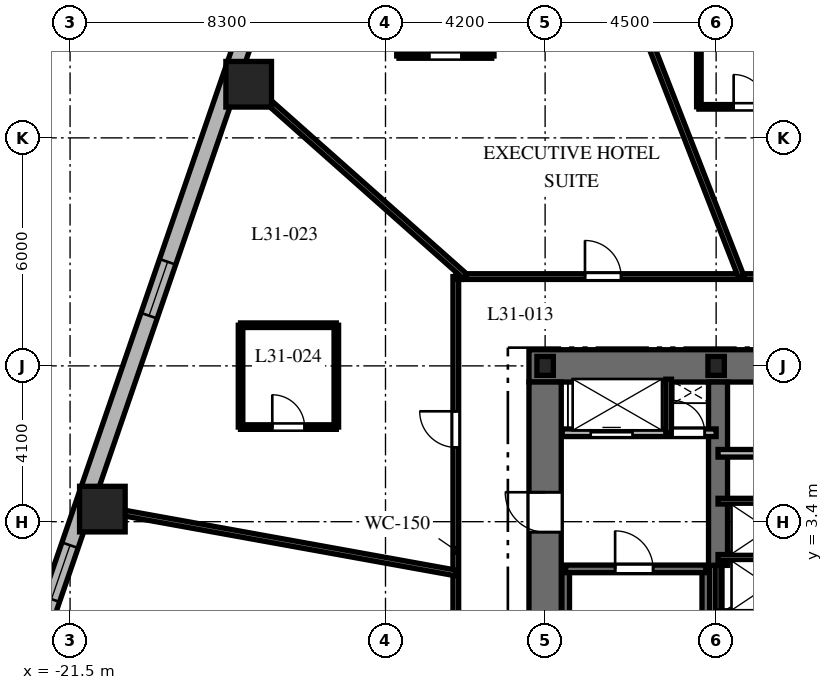
"""IFC4 building model, lengths in metres.
Left out: names, types, materials, properties, quantities, classifications, styles, units other than length and angle.
Written with IfcOpenShell. Run it as: python <this file> out.ifc"""

import sys

from ifc_helpers import new_model, si_unit, direction, frame, frame_2d, origin, origin_2d, place, context, subcontext, project, spatial, rectangle, i_section, extrude, element, fill, save


model = new_model("IFC4")
c1 = context("Model", 3, precision=1e-05, world=origin(), true_north=direction((0.0, 1.0)))
c2 = subcontext(c1, "Body", "Model", "MODEL_VIEW")
j1 = project(units=[si_unit("LENGTHUNIT", "METRE"), si_unit("PLANEANGLEUNIT", "RADIAN")], contexts=[c1])
p1 = place(None, origin())
s1 = spatial("IfcSite", under=j1, at=p1, CompositionType="ELEMENT")
p2 = place(p1, origin())
s2 = spatial("IfcBuilding", under=s1, at=p2, CompositionType="ELEMENT")
p3 = place(p2, frame((0.0, 0.0, 128.4)))
s3 = spatial("IfcBuildingStorey", under=s2, at=p3, CompositionType="ELEMENT", Elevation=128.4)
p4 = place(p3, frame((-9.425, 7.5, 0.0), z_axis=(0.0, 0.0, 1.0), x_axis=(1.0, 0.0, 0.0)))
e1 = element("IfcWall", 1, at=p4, inside=s3, PredefinedType="SHEAR", context=c2, shape_type="SweptSolid", body=[
    extrude(rectangle(XDim=9.475, YDim=0.85, at=frame_2d((4.738, 0.0))), origin(), (0.0, 0.0, 1.0), 3.7),
])
p5 = place(p3, frame((-9.0, -7.075, 0.0), z_axis=(0.0, 0.0, 1.0), x_axis=(0.0, 1.0, 0.0)))
e2 = element("IfcWall", 2, at=p5, inside=s3, PredefinedType="SHEAR", context=c2, shape_type="SweptSolid", body=[
    extrude(rectangle(XDim=14.15, YDim=0.85, at=frame_2d((7.075, 0.0))), origin(), (0.0, 0.0, 1.0), 3.7),
])
p6 = place(p5, frame((10.2, 0.0, 0.0)))
e3 = element("IfcOpeningElement", 3, at=p6, cuts=e2, PredefinedType="OPENING", context=c2, shape_type="SweptSolid", body=[
    extrude(rectangle(XDim=1.05, YDim=2.15, at=frame_2d((0.525, 1.075))), frame((0.0, 0.435, 0.0), z_axis=(0.0, -1.0, 0.0), x_axis=(1.0, 0.0, 0.0)), (0.0, 0.0, 1.0), 0.87),
])
p7 = place(p3, frame((-4.45, 2.25, 0.0), z_axis=(0.0, 0.0, 1.0), x_axis=(0.0, 1.0, 0.0)))
e4 = element("IfcWall", 4, at=p7, inside=s3, PredefinedType="SHEAR", context=c2, shape_type="SweptSolid", body=[
    extrude(rectangle(XDim=4.825, YDim=0.5, at=frame_2d((2.413, 0.0))), origin(), (0.0, 0.0, 1.0), 3.7),
])
for number, where, z_axis, x_axis in (
    (5, (-8.458, -6.985, 0.0), (0.0, 0.0, 1.0), (0.0, 1.0, 0.0)),
    (6, (-4.772, -6.985, 0.0), (0.0, 0.0, 1.0), (0.0, 1.0, 0.0)),
):
    element("IfcWall", number, at=place(p3, frame(where, z_axis=z_axis, x_axis=x_axis)), inside=s3, PredefinedType="SHEAR", context=c2, shape_type="SweptSolid", body=[
        extrude(rectangle(XDim=9.143, YDim=0.2, at=frame_2d((4.572, 0.0))), origin(), (0.0, 0.0, 1.0), 3.7),
    ])
p8 = place(p3, frame((-8.458, 2.158, 0.0), z_axis=(0.0, 0.0, 1.0), x_axis=(1.0, 0.0, 0.0)))
e7 = element("IfcWall", 7, at=p8, inside=s3, PredefinedType="SHEAR", context=c2, shape_type="SweptSolid", body=[
    extrude(rectangle(XDim=3.686, YDim=0.2, at=frame_2d((1.843, 0.0))), origin(), (0.0, 0.0, 1.0), 3.7),
])
p9 = place(p8, frame((1.3, 0.0, 0.0)))
e8 = element("IfcOpeningElement", 8, at=p9, cuts=e7, PredefinedType="OPENING", context=c2, shape_type="SweptSolid", body=[
    extrude(rectangle(XDim=1.0, YDim=2.15, at=frame_2d((0.5, 1.075))), frame((0.0, 0.11, 0.0), z_axis=(0.0, -1.0, 0.0), x_axis=(1.0, 0.0, 0.0)), (0.0, 0.0, 1.0), 0.22),
])
for number, where, z_axis, x_axis in (
    (9, (-4.5, 7.5, 0.0), (0.0, 0.0, 1.0), (1.0, 0.0, 0.0)),
    (10, (-9.0, 7.5, 0.0), (0.0, 0.0, 1.0), (1.0, 0.0, 0.0)),
):
    element("IfcColumn", number, at=place(p3, frame(where, z_axis=z_axis, x_axis=x_axis)), inside=s3, PredefinedType="COLUMN", context=c2, shape_type="SweptSolid", body=[
        extrude(i_section(OverallWidth=0.432, OverallDepth=0.498, WebThickness=0.056, FlangeThickness=0.089, at=origin_2d()), origin(), (0.0, 0.0, 1.0), 3.7),
    ])
for number, where, z_axis, x_axis in (
    (11, (-16.8, 14.911, 0.0), (0.0, 0.0, 1.0), (1.0, 0.0, 0.0)),
    (12, (-20.65, 3.731, 0.0), (0.0, 0.0, 1.0), (1.0, 0.0, 0.0)),
):
    element("IfcColumn", number, at=place(p3, frame(where, z_axis=z_axis, x_axis=x_axis)), inside=s3, PredefinedType="COLUMN", context=c2, shape_type="SweptSolid", body=[
        extrude(rectangle(XDim=1.2, YDim=1.2, at=origin_2d()), origin(), (0.0, 0.0, 1.0), 3.7),
    ])
p10 = place(p3, frame((-15.992, 18.777, 0.0), z_axis=(0.0, 0.0, 1.0), x_axis=(-0.325606988926, -0.945505202927, 0.0)))
e13 = element("IfcWall", 13, at=p10, inside=s3, PredefinedType="SOLIDWALL", context=c2, shape_type="SweptSolid", body=[
    extrude(rectangle(XDim=19.669, YDim=0.45, at=frame_2d((9.835, 0.0))), origin(), (0.0, 0.0, 1.0), 3.4),
])
p11 = place(p10, frame((1.197, 0.0, 0.8)))
e14 = element("IfcOpeningElement", 14, at=p11, cuts=e13, PredefinedType="OPENING", context=c2, shape_type="SweptSolid", body=[
    extrude(rectangle(XDim=1.5, YDim=1.8, at=frame_2d((0.75, 0.9))), frame((0.0, 0.235, 0.0), z_axis=(0.0, -1.0, 0.0), x_axis=(1.0, 0.0, 0.0)), (0.0, 0.0, 1.0), 0.47),
])
p12 = place(p10, frame((9.03, 0.0, 0.8)))
e15 = element("IfcOpeningElement", 15, at=p12, cuts=e13, PredefinedType="OPENING", context=c2, shape_type="SweptSolid", body=[
    extrude(rectangle(XDim=1.5, YDim=1.8, at=frame_2d((0.75, 0.9))), frame((0.0, 0.235, 0.0), z_axis=(0.0, -1.0, 0.0), x_axis=(1.0, 0.0, 0.0)), (0.0, 0.0, 1.0), 0.47),
])
p13 = place(p10, frame((16.918, 0.0, 0.8)))
e16 = element("IfcOpeningElement", 16, at=p13, cuts=e13, PredefinedType="OPENING", context=c2, shape_type="SweptSolid", body=[
    extrude(rectangle(XDim=1.5, YDim=1.8, at=frame_2d((0.75, 0.9))), frame((0.0, 0.235, 0.0), z_axis=(0.0, -1.0, 0.0), x_axis=(1.0, 0.0, 0.0)), (0.0, 0.0, 1.0), 0.47),
])
p14 = place(p3, frame((-8.55, 5.74, 0.0), z_axis=(0.0, 0.0, 1.0), x_axis=(1.0, 0.0, 0.0)))
e17 = element("IfcWall", 17, at=p14, inside=s3, PredefinedType="PARTITIONING", context=c2, shape_type="SweptSolid", body=[
    extrude(rectangle(XDim=4.05, YDim=0.2, at=frame_2d((2.025, 0.0))), origin(), (0.0, 0.0, 1.0), 3.4),
])
p15 = place(p14, frame((0.75, 0.0, 0.0)))
e18 = element("IfcOpeningElement", 18, at=p15, cuts=e17, PredefinedType="OPENING", context=c2, shape_type="SweptSolid", body=[
    extrude(rectangle(XDim=1.1, YDim=2.2, at=frame_2d((0.55, 1.1))), frame((0.0, 0.11, 0.0), z_axis=(0.0, -1.0, 0.0), x_axis=(1.0, 0.0, 0.0)), (0.0, 0.0, 1.0), 0.22),
])
p16 = place(p14, frame((2.9, 0.0, 0.0)))
e19 = element("IfcOpeningElement", 19, at=p16, cuts=e17, PredefinedType="OPENING", context=c2, shape_type="SweptSolid", body=[
    extrude(rectangle(XDim=0.85, YDim=2.03, at=frame_2d((0.425, 1.015))), frame((0.0, 0.11, 0.0), z_axis=(0.0, -1.0, 0.0), x_axis=(1.0, 0.0, 0.0)), (0.0, 0.0, 1.0), 0.22),
])
p17 = place(p3, frame((-5.75, 5.74, 0.0), z_axis=(0.0, 0.0, 1.0), x_axis=(0.0, 1.0, 0.0)))
e20 = element("IfcWall", 20, at=p17, inside=s3, PredefinedType="PARTITIONING", context=c2, shape_type="SweptSolid", body=[
    extrude(rectangle(XDim=1.41, YDim=0.15, at=frame_2d((0.705, 0.0))), origin(), (0.0, 0.0, 1.0), 3.4),
])
p18 = place(p3, frame((-4.45, 5.2, 0.0), z_axis=(0.0, 0.0, 1.0), x_axis=(1.0, 0.0, 0.0)))
e21 = element("IfcWall", 21, at=p18, inside=s3, PredefinedType="PARTITIONING", context=c2, shape_type="SweptSolid", body=[
    extrude(rectangle(XDim=4.5, YDim=0.2, at=frame_2d((2.25, 0.0))), origin(), (0.0, 0.0, 1.0), 3.4),
])
p19 = place(p3, frame((-4.45, -0.5, 0.0), z_axis=(0.0, 0.0, 1.0), x_axis=(0.0, 1.0, 0.0)))
e22 = element("IfcWall", 22, at=p19, inside=s3, PredefinedType="PARTITIONING", context=c2, shape_type="SweptSolid", body=[
    extrude(rectangle(XDim=2.75, YDim=0.15, at=frame_2d((1.375, 0.0))), origin(), (0.0, 0.0, 1.0), 3.4),
])
for number, where, z_axis, x_axis in (
    (23, (-4.45, 3.94, 0.0), (0.0, 0.0, 1.0), (1.0, 0.0, 0.0)),
    (24, (-4.45, 0.98, 0.0), (0.0, 0.0, 1.0), (1.0, 0.0, 0.0)),
    (25, (-4.45, 2.46, 0.0), (0.0, 0.0, 1.0), (1.0, 0.0, 0.0)),
):
    element("IfcWall", number, at=place(p3, frame(where, z_axis=z_axis, x_axis=x_axis)), inside=s3, PredefinedType="PARTITIONING", context=c2, shape_type="SweptSolid", body=[
        extrude(rectangle(XDim=2.55, YDim=0.15, at=frame_2d((1.275, 0.0))), origin(), (0.0, 0.0, 1.0), 3.4),
    ])
p20 = place(p3, frame((-11.35, -9.85, 0.0), z_axis=(0.0, 0.0, 1.0), x_axis=(0.0, 1.0, 0.0)))
e26 = element("IfcWall", 26, at=p20, inside=s3, PredefinedType="PARTITIONING", context=c2, shape_type="SweptSolid", body=[
    extrude(rectangle(XDim=19.7, YDim=0.15, at=frame_2d((9.85, 0.0))), origin(), (0.0, 0.0, 1.0), 2.84),
])
p21 = place(p20, frame((15.205, 0.0, 0.0)))
e27 = element("IfcOpeningElement", 27, at=p21, cuts=e26, PredefinedType="OPENING", context=c2, shape_type="SweptSolid", body=[
    extrude(rectangle(XDim=0.95, YDim=2.03, at=frame_2d((0.475, 1.015))), frame((0.0, 0.085, 0.0), z_axis=(0.0, -1.0, 0.0), x_axis=(1.0, 0.0, 0.0)), (0.0, 0.0, 1.0), 0.17),
])
p22 = place(p20, frame((8.836, 0.0, 0.0)))
e28 = element("IfcOpeningElement", 28, at=p22, cuts=e26, PredefinedType="OPENING", context=c2, shape_type="SweptSolid", body=[
    extrude(rectangle(XDim=0.95, YDim=2.03, at=frame_2d((0.475, 1.015))), frame((0.0, 0.085, 0.0), z_axis=(0.0, -1.0, 0.0), x_axis=(1.0, 0.0, 0.0)), (0.0, 0.0, 1.0), 0.17),
])
p23 = place(p20, frame((3.008, 0.0, 0.0)))
e29 = element("IfcOpeningElement", 29, at=p23, cuts=e26, PredefinedType="OPENING", context=c2, shape_type="SweptSolid", body=[
    extrude(rectangle(XDim=0.95, YDim=2.03, at=frame_2d((0.475, 1.015))), frame((0.0, 0.085, 0.0), z_axis=(0.0, -1.0, 0.0), x_axis=(1.0, 0.0, 0.0)), (0.0, 0.0, 1.0), 0.17),
])
p24 = place(p3, frame((-11.35, 9.85, 0.0), z_axis=(0.0, 0.0, 1.0), x_axis=(1.0, 0.0, 0.0)))
e30 = element("IfcWall", 30, at=p24, inside=s3, PredefinedType="PARTITIONING", context=c2, shape_type="SweptSolid", body=[
    extrude(rectangle(XDim=22.7, YDim=0.15, at=frame_2d((11.35, 0.0))), origin(), (0.0, 0.0, 1.0), 2.84),
])
p25 = place(p24, frame((17.237, 0.0, 0.0)))
e31 = element("IfcOpeningElement", 31, at=p25, cuts=e30, PredefinedType="OPENING", context=c2, shape_type="SweptSolid", body=[
    extrude(rectangle(XDim=0.95, YDim=2.03, at=frame_2d((0.475, 1.015))), frame((0.0, 0.085, 0.0), z_axis=(0.0, -1.0, 0.0), x_axis=(1.0, 0.0, 0.0)), (0.0, 0.0, 1.0), 0.17),
])
p26 = place(p24, frame((11.994, 0.0, 0.0)))
e32 = element("IfcOpeningElement", 32, at=p26, cuts=e30, PredefinedType="OPENING", context=c2, shape_type="SweptSolid", body=[
    extrude(rectangle(XDim=0.95, YDim=2.03, at=frame_2d((0.475, 1.015))), frame((0.0, 0.085, 0.0), z_axis=(0.0, -1.0, 0.0), x_axis=(1.0, 0.0, 0.0)), (0.0, 0.0, 1.0), 0.17),
])
p27 = place(p24, frame((8.559, 0.0, 0.0)))
e33 = element("IfcOpeningElement", 33, at=p27, cuts=e30, PredefinedType="OPENING", context=c2, shape_type="SweptSolid", body=[
    extrude(rectangle(XDim=0.95, YDim=2.03, at=frame_2d((0.475, 1.015))), frame((0.0, 0.085, 0.0), z_axis=(0.0, -1.0, 0.0), x_axis=(1.0, 0.0, 0.0)), (0.0, 0.0, 1.0), 0.17),
])
p28 = place(p24, frame((3.399, 0.0, 0.0)))
e34 = element("IfcOpeningElement", 34, at=p28, cuts=e30, PredefinedType="OPENING", context=c2, shape_type="SweptSolid", body=[
    extrude(rectangle(XDim=0.95, YDim=2.03, at=frame_2d((0.475, 1.015))), frame((0.0, 0.085, 0.0), z_axis=(0.0, -1.0, 0.0), x_axis=(1.0, 0.0, 0.0)), (0.0, 0.0, 1.0), 0.17),
])
p29 = place(p3, frame((-3.842, 9.85, 0.0), z_axis=(0.0, 0.0, 1.0), x_axis=(-0.363432685593, 0.931620460833, 0.0)))
e35 = element("IfcWall", 35, at=p29, inside=s3, PredefinedType="PARTITIONING", context=c2, shape_type="SweptSolid", body=[
    extrude(rectangle(XDim=12.049, YDim=0.15, at=frame_2d((6.024, 0.0))), origin(), (0.0, 0.0, 1.0), 2.54),
])
p30 = place(p3, frame((-11.098, 9.85, 0.0), z_axis=(0.0, 0.0, 1.0), x_axis=(-0.747904295103, 0.663806572253, 0.0)))
e36 = element("IfcWall", 36, at=p30, inside=s3, PredefinedType="PARTITIONING", context=c2, shape_type="SweptSolid", body=[
    extrude(rectangle(XDim=8.16, YDim=0.15, at=frame_2d((4.08, 0.0))), origin(), (0.0, 0.0, 1.0), 2.54),
])
p31 = place(p3, frame((-11.35, 2.051, 0.0), z_axis=(0.0, 0.0, 1.0), x_axis=(-0.984068313063, 0.177790762484, 0.0)))
e37 = element("IfcWall", 37, at=p31, inside=s3, PredefinedType="PARTITIONING", context=c2, shape_type="SweptSolid", body=[
    extrude(rectangle(XDim=9.951, YDim=0.15, at=frame_2d((4.976, 0.0))), origin(), (0.0, 0.0, 1.0), 2.54),
])
p32 = place(p3, frame((-4.954, 14.317, 0.0), z_axis=(0.0, 0.0, 1.0), x_axis=(1.0, 0.0, 0.0)))
e38 = element("IfcWall", 38, at=p32, inside=s3, PredefinedType="PARTITIONING", context=c2, shape_type="SweptSolid", body=[
    extrude(rectangle(XDim=2.68, YDim=0.12, at=frame_2d((1.34, 0.0))), origin(), (0.0, 0.0, 1.0), 3.4),
])
p33 = place(p32, frame((0.915, 0.0, 0.0)))
e39 = element("IfcOpeningElement", 39, at=p33, cuts=e38, PredefinedType="OPENING", context=c2, shape_type="SweptSolid", body=[
    extrude(rectangle(XDim=0.85, YDim=2.03, at=frame_2d((0.425, 1.015))), frame((0.0, 0.07, 0.0), z_axis=(0.0, -1.0, 0.0), x_axis=(1.0, 0.0, 0.0)), (0.0, 0.0, 1.0), 0.14),
])
p34 = place(p3, frame((-4.954, 16.857, 0.0), z_axis=(0.0, 0.0, 1.0), x_axis=(0.0, -1.0, 0.0)))
e40 = element("IfcWall", 40, at=p34, inside=s3, PredefinedType="PARTITIONING", context=c2, shape_type="SweptSolid", body=[
    extrude(rectangle(XDim=2.54, YDim=0.12, at=frame_2d((1.27, 0.0))), origin(), (0.0, 0.0, 1.0), 2.841),
])
p35 = place(p3, frame((-12.845, 15.655, 0.0), z_axis=(0.0, 0.0, 1.0), x_axis=(1.0, 0.0, 0.0)))
e41 = element("IfcWall", 41, at=p35, inside=s3, PredefinedType="PARTITIONING", context=c2, shape_type="SweptSolid", body=[
    extrude(rectangle(XDim=2.44, YDim=0.12, at=frame_2d((1.22, 0.0))), origin(), (0.0, 0.0, 1.0), 3.4),
])
p36 = place(p35, frame((0.795, 0.0, 0.0)))
e42 = element("IfcOpeningElement", 42, at=p36, cuts=e41, PredefinedType="OPENING", context=c2, shape_type="SweptSolid", body=[
    extrude(rectangle(XDim=0.85, YDim=2.03, at=frame_2d((0.425, 1.015))), frame((0.0, 0.07, 0.0), z_axis=(0.0, -1.0, 0.0), x_axis=(1.0, 0.0, 0.0)), (0.0, 0.0, 1.0), 0.14),
])
p37 = place(p3, frame((-10.405, 15.655, 0.0), z_axis=(0.0, 0.0, 1.0), x_axis=(0.0, 1.0, 0.0)))
e43 = element("IfcWall", 43, at=p37, inside=s3, PredefinedType="PARTITIONING", context=c2, shape_type="SweptSolid", body=[
    extrude(rectangle(XDim=2.61, YDim=0.12, at=frame_2d((1.305, 0.0))), origin(), (0.0, 0.0, 1.0), 3.4),
])
p38 = place(p3, frame((-12.845, 18.265, 0.0), z_axis=(0.0, 0.0, 1.0), x_axis=(0.0, -1.0, 0.0)))
e44 = element("IfcWall", 44, at=p38, inside=s3, PredefinedType="PARTITIONING", context=c2, shape_type="SweptSolid", body=[
    extrude(rectangle(XDim=2.61, YDim=0.12, at=frame_2d((1.305, 0.0))), origin(), (0.0, 0.0, 1.0), 2.54),
])
p39 = place(p3, frame((-17.014, 5.89, 0.0), z_axis=(0.0, 0.0, 1.0), x_axis=(1.0, 0.0, 0.0)))
e45 = element("IfcWall", 45, at=p39, inside=s3, PredefinedType="PARTITIONING", context=c2, shape_type="SweptSolid", body=[
    extrude(rectangle(XDim=2.52, YDim=0.12, at=frame_2d((1.26, 0.0))), origin(), (0.0, 0.0, 1.0), 2.84),
])
p40 = place(p39, frame((0.835, 0.0, 0.0)))
e46 = element("IfcOpeningElement", 46, at=p40, cuts=e45, PredefinedType="OPENING", context=c2, shape_type="SweptSolid", body=[
    extrude(rectangle(XDim=0.85, YDim=2.03, at=frame_2d((0.425, 1.015))), frame((0.0, 0.07, 0.0), z_axis=(0.0, -1.0, 0.0), x_axis=(1.0, 0.0, 0.0)), (0.0, 0.0, 1.0), 0.14),
])
p41 = place(p3, frame((-14.494, 5.89, 0.0), z_axis=(0.0, 0.0, 1.0), x_axis=(0.0, 1.0, 0.0)))
e47 = element("IfcWall", 47, at=p41, inside=s3, PredefinedType="PARTITIONING", context=c2, shape_type="SweptSolid", body=[
    extrude(rectangle(XDim=2.68, YDim=0.12, at=frame_2d((1.34, 0.0))), origin(), (0.0, 0.0, 1.0), 3.4),
])
p42 = place(p3, frame((-14.494, 8.57, 0.0), z_axis=(0.0, 0.0, 1.0), x_axis=(-1.0, 0.0, 0.0)))
e48 = element("IfcWall", 48, at=p42, inside=s3, PredefinedType="PARTITIONING", context=c2, shape_type="SweptSolid", body=[
    extrude(rectangle(XDim=2.52, YDim=0.12, at=frame_2d((1.26, 0.0))), origin(), (0.0, 0.0, 1.0), 2.972),
])
p43 = place(p3, frame((-17.014, 8.57, 0.0), z_axis=(0.0, 0.0, 1.0), x_axis=(0.0, -1.0, 0.0)))
e49 = element("IfcWall", 49, at=p43, inside=s3, PredefinedType="PARTITIONING", context=c2, shape_type="SweptSolid", body=[
    extrude(rectangle(XDim=2.68, YDim=0.12, at=frame_2d((1.34, 0.0))), origin(), (0.0, 0.0, 1.0), 3.4),
])
p44 = place(p12, origin())
e50 = element("IfcWindow", 50, at=p44, inside=s3, PartitioningType="SINGLE_PANEL", PredefinedType="WINDOW", context=c2, shape_type="SweptSolid", body=[
    extrude(rectangle(XDim=1.5, YDim=1.8, at=frame_2d((0.75, 0.9))), frame((0.0, 0.03, 0.0), z_axis=(0.0, -1.0, 0.0), x_axis=(1.0, 0.0, 0.0)), (0.0, 0.0, 1.0), 0.06),
])
fill(e15, e50)
p45 = place(p13, origin())
e51 = element("IfcWindow", 51, at=p45, inside=s3, PartitioningType="SINGLE_PANEL", PredefinedType="WINDOW", context=c2, shape_type="SweptSolid", body=[
    extrude(rectangle(XDim=1.5, YDim=1.8, at=frame_2d((0.75, 0.9))), frame((0.0, 0.03, 0.0), z_axis=(0.0, -1.0, 0.0), x_axis=(1.0, 0.0, 0.0)), (0.0, 0.0, 1.0), 0.06),
])
fill(e16, e51)
p46 = place(p9, origin())
e52 = element("IfcDoor", 52, at=p46, inside=s3, OperationType="SINGLE_SWING_LEFT", PredefinedType="DOOR", context=c2, shape_type="SweptSolid", body=[
    extrude(rectangle(XDim=1.0, YDim=2.15, at=frame_2d((0.5, 1.075))), frame((0.0, 0.025, 0.0), z_axis=(0.0, -1.0, 0.0), x_axis=(1.0, 0.0, 0.0)), (0.0, 0.0, 1.0), 0.05),
])
fill(e8, e52)
p47 = place(p6, origin())
e53 = element("IfcDoor", 53, at=p47, inside=s3, OperationType="SINGLE_SWING_RIGHT", PredefinedType="DOOR", context=c2, shape_type="SweptSolid", body=[
    extrude(rectangle(XDim=1.05, YDim=2.15, at=frame_2d((0.525, 1.075))), frame((0.0, 0.025, 0.0), z_axis=(0.0, -1.0, 0.0), x_axis=(1.0, 0.0, 0.0)), (0.0, 0.0, 1.0), 0.05),
])
fill(e3, e53)
p48 = place(p15, origin())
e54 = element("IfcDoor", 54, at=p48, inside=s3, OperationType="SLIDING_TO_LEFT", PredefinedType="DOOR", context=c2, shape_type="SweptSolid", body=[
    extrude(rectangle(XDim=1.1, YDim=2.2, at=frame_2d((0.55, 1.1))), frame((0.0, 0.025, 0.0), z_axis=(0.0, -1.0, 0.0), x_axis=(1.0, 0.0, 0.0)), (0.0, 0.0, 1.0), 0.05),
])
fill(e18, e54)
p49 = place(p16, origin())
e55 = element("IfcDoor", 55, at=p49, inside=s3, OperationType="SINGLE_SWING_LEFT", PredefinedType="DOOR", context=c2, shape_type="SweptSolid", body=[
    extrude(rectangle(XDim=0.85, YDim=2.03, at=frame_2d((0.425, 1.015))), frame((0.0, 0.025, 0.0), z_axis=(0.0, -1.0, 0.0), x_axis=(1.0, 0.0, 0.0)), (0.0, 0.0, 1.0), 0.05),
])
fill(e19, e55)
p50 = place(p33, origin())
e56 = element("IfcDoor", 56, at=p50, inside=s3, OperationType="SINGLE_SWING_LEFT", PredefinedType="DOOR", context=c2, shape_type="SweptSolid", body=[
    extrude(rectangle(XDim=0.85, YDim=2.03, at=frame_2d((0.425, 1.015))), frame((0.0, 0.025, 0.0), z_axis=(0.0, -1.0, 0.0), x_axis=(1.0, 0.0, 0.0)), (0.0, 0.0, 1.0), 0.05),
])
fill(e39, e56)
p51 = place(p28, origin())
e57 = element("IfcDoor", 57, at=p51, inside=s3, OperationType="SINGLE_SWING_LEFT", PredefinedType="DOOR", context=c2, shape_type="SweptSolid", body=[
    extrude(rectangle(XDim=0.95, YDim=2.03, at=frame_2d((0.475, 1.015))), frame((0.0, 0.025, 0.0), z_axis=(0.0, -1.0, 0.0), x_axis=(1.0, 0.0, 0.0)), (0.0, 0.0, 1.0), 0.05),
])
fill(e34, e57)
p52 = place(p36, origin())
e58 = element("IfcDoor", 58, at=p52, inside=s3, OperationType="SINGLE_SWING_RIGHT", PredefinedType="DOOR", context=c2, shape_type="SweptSolid", body=[
    extrude(rectangle(XDim=0.85, YDim=2.03, at=frame_2d((0.425, 1.015))), frame((0.0, 0.025, 0.0), z_axis=(0.0, -1.0, 0.0), x_axis=(1.0, 0.0, 0.0)), (0.0, 0.0, 1.0), 0.05),
])
fill(e42, e58)
p53 = place(p21, origin())
e59 = element("IfcDoor", 59, at=p53, inside=s3, OperationType="SINGLE_SWING_RIGHT", PredefinedType="DOOR", context=c2, shape_type="SweptSolid", body=[
    extrude(rectangle(XDim=0.95, YDim=2.03, at=frame_2d((0.475, 1.015))), frame((0.0, 0.025, 0.0), z_axis=(0.0, -1.0, 0.0), x_axis=(1.0, 0.0, 0.0)), (0.0, 0.0, 1.0), 0.05),
])
fill(e27, e59)
p54 = place(p40, origin())
e60 = element("IfcDoor", 60, at=p54, inside=s3, OperationType="SINGLE_SWING_LEFT", PredefinedType="DOOR", context=c2, shape_type="SweptSolid", body=[
    extrude(rectangle(XDim=0.85, YDim=2.03, at=frame_2d((0.425, 1.015))), frame((0.0, 0.025, 0.0), z_axis=(0.0, -1.0, 0.0), x_axis=(1.0, 0.0, 0.0)), (0.0, 0.0, 1.0), 0.05),
])
fill(e46, e60)
save(model, sys.argv[1])
